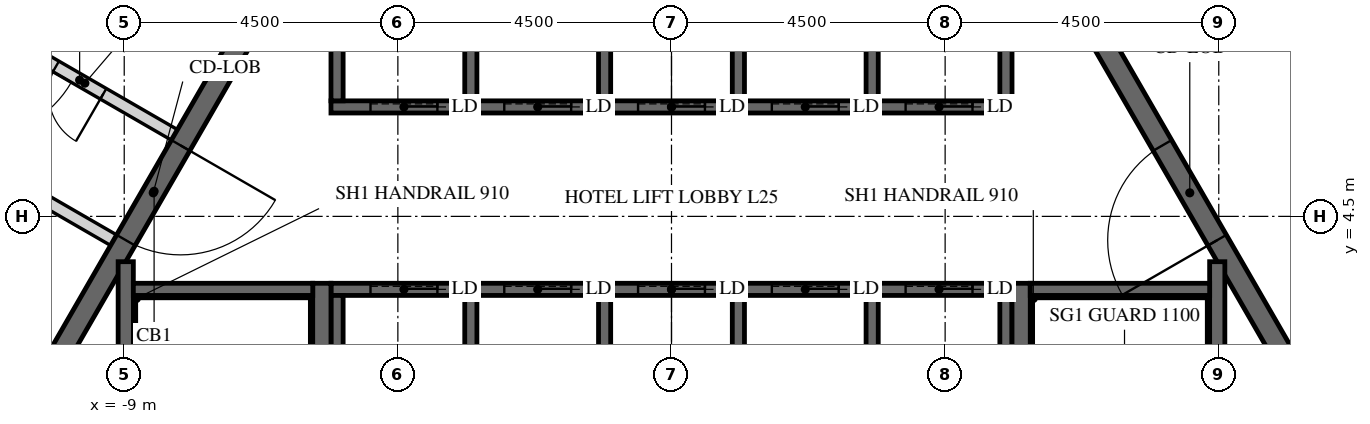
"""IFC4 building model, lengths in metres.
Left out: names, types, materials, properties, quantities, classifications, styles, units other than length and angle.
Written with IfcOpenShell. Run it as: python <this file> out.ifc"""

import sys

from ifc_helpers import new_model, si_unit, direction, frame, frame_2d, origin, place, context, subcontext, project, spatial, polyline, rectangle, outline, extrude, element, fill, save


model = new_model("IFC4")
c1 = context("Model", 3, precision=1e-05, world=origin(), true_north=direction((0.0, 1.0)))
c2 = subcontext(c1, "Body", "Model", "MODEL_VIEW")
j1 = project(units=[si_unit("LENGTHUNIT", "METRE"), si_unit("PLANEANGLEUNIT", "RADIAN")], contexts=[c1])
p1 = place(None, origin())
s1 = spatial("IfcSite", under=j1, at=p1, CompositionType="ELEMENT")
p2 = place(p1, origin())
s2 = spatial("IfcBuilding", under=s1, at=p2, CompositionType="ELEMENT")
p3 = place(p2, frame((0.0, 0.0, 111.6)))
s3 = spatial("IfcBuildingStorey", under=s2, at=p3, CompositionType="ELEMENT", Elevation=111.6)
p4 = place(p3, frame((-7.91, 13.7, -0.15), z_axis=(0.0, 0.0, 1.0), x_axis=(-0.499999880136, -0.866025472988, 0.0)))
e1 = element("IfcWall", 1, at=p4, inside=s3, PredefinedType="SHEAR", context=c2, shape_type="SweptSolid", body=[
    extrude(outline(polyline([(-0.173, -0.3), (15.993, -0.3), (15.646, 0.3), (0.173, 0.3), (-0.173, -0.3)])), origin(), (0.0, 0.0, 1.0), 3.9),
])
p5 = place(p4, frame((7.039, 0.0, 0.15)))
e2 = element("IfcOpeningElement", 2, at=p5, cuts=e1, PredefinedType="OPENING", context=c2, shape_type="SweptSolid", body=[
    extrude(rectangle(XDim=1.8, YDim=2.4, at=frame_2d((0.9, 1.2))), frame((0.0, 0.31, 0.0), z_axis=(0.0, -1.0, 0.0), x_axis=(1.0, 0.0, 0.0)), (0.0, 0.0, 1.0), 0.62),
])
p6 = place(p3, frame((15.819, 0.0, -0.15), z_axis=(0.0, 0.0, 1.0), x_axis=(-0.499999880136, 0.866025472988, 0.0)))
e3 = element("IfcWall", 3, at=p6, inside=s3, PredefinedType="SHEAR", context=c2, shape_type="SweptSolid", body=[
    extrude(outline(polyline([(-0.173, -0.3), (15.993, -0.3), (15.646, 0.3), (0.173, 0.3), (-0.173, -0.3)])), origin(), (0.0, 0.0, 1.0), 3.9),
])
p7 = place(p6, frame((6.981, 0.0, 0.15)))
e4 = element("IfcOpeningElement", 4, at=p7, cuts=e3, PredefinedType="OPENING", context=c2, shape_type="SweptSolid", body=[
    extrude(rectangle(XDim=1.8, YDim=2.4, at=frame_2d((0.9, 1.2))), frame((0.0, 0.31, 0.0), z_axis=(0.0, -1.0, 0.0), x_axis=(1.0, 0.0, 0.0)), (0.0, 0.0, 1.0), 0.62),
])
p8 = place(p3, frame((-5.673, 9.825, -0.15), z_axis=(0.0, 0.0, 1.0), x_axis=(-0.499995046907, -0.866028263435, 0.0)))
e5 = element("IfcWall", 5, at=p8, inside=s3, PredefinedType="SHEAR", context=c2, shape_type="SweptSolid", body=[
    extrude(outline(polyline([(-0.101, -0.175), (11.446, -0.175), (11.244, 0.175), (0.101, 0.175), (-0.101, -0.175)])), origin(), (0.0, 0.0, 1.0), 3.9),
])
p9 = place(p8, frame((4.801, 0.0, 0.15)))
e6 = element("IfcOpeningElement", 6, at=p9, cuts=e5, PredefinedType="OPENING", context=c2, shape_type="SweptSolid", body=[
    extrude(rectangle(XDim=1.8, YDim=2.4, at=frame_2d((0.9, 1.2))), frame((0.0, 0.185, 0.0), z_axis=(0.0, -1.0, 0.0), x_axis=(1.0, 0.0, 0.0)), (0.0, 0.0, 1.0), 0.37),
])
p10 = place(p3, frame((11.345, 0.0, -0.15), z_axis=(0.0, 0.0, 1.0), x_axis=(-0.499995046907, 0.866028263435, 0.0)))
e7 = element("IfcWall", 7, at=p10, inside=s3, PredefinedType="SHEAR", context=c2, shape_type="SweptSolid", body=[
    extrude(outline(polyline([(-0.101, -0.175), (11.446, -0.175), (11.244, 0.175), (0.101, 0.175), (-0.101, -0.175)])), origin(), (0.0, 0.0, 1.0), 3.9),
])
p11 = place(p10, frame((4.744, 0.0, 0.15)))
e8 = element("IfcOpeningElement", 8, at=p11, cuts=e7, PredefinedType="OPENING", context=c2, shape_type="SweptSolid", body=[
    extrude(rectangle(XDim=1.8, YDim=2.4, at=frame_2d((0.9, 1.2))), frame((0.0, 0.185, 0.0), z_axis=(0.0, -1.0, 0.0), x_axis=(1.0, 0.0, 0.0)), (0.0, 0.0, 1.0), 0.37),
])
p12 = place(p3, frame((-5.6, 6.3, -0.25), z_axis=(0.0, 0.0, 1.0), x_axis=(1.0, 0.0, 0.0)))
e9 = element("IfcWall", 9, at=p12, inside=s3, PredefinedType="SHEAR", context=c2, shape_type="SweptSolid", body=[
    extrude(rectangle(XDim=11.2, YDim=0.2, at=frame_2d((5.6, 0.0))), origin(), (0.0, 0.0, 1.0), 3.9),
])
p13 = place(p12, frame((0.65, 0.0, 0.25)))
e10 = element("IfcOpeningElement", 10, at=p13, cuts=e9, PredefinedType="OPENING", context=c2, shape_type="SweptSolid", body=[
    extrude(rectangle(XDim=1.1, YDim=2.1, at=frame_2d((0.55, 1.05))), frame((0.0, 0.11, 0.0), z_axis=(0.0, -1.0, 0.0), x_axis=(1.0, 0.0, 0.0)), (0.0, 0.0, 1.0), 0.22),
])
p14 = place(p12, frame((2.85, 0.0, 0.25)))
e11 = element("IfcOpeningElement", 11, at=p14, cuts=e9, PredefinedType="OPENING", context=c2, shape_type="SweptSolid", body=[
    extrude(rectangle(XDim=1.1, YDim=2.1, at=frame_2d((0.55, 1.05))), frame((0.0, 0.11, 0.0), z_axis=(0.0, -1.0, 0.0), x_axis=(1.0, 0.0, 0.0)), (0.0, 0.0, 1.0), 0.22),
])
p15 = place(p12, frame((5.05, 0.0, 0.25)))
e12 = element("IfcOpeningElement", 12, at=p15, cuts=e9, PredefinedType="OPENING", context=c2, shape_type="SweptSolid", body=[
    extrude(rectangle(XDim=1.1, YDim=2.1, at=frame_2d((0.55, 1.05))), frame((0.0, 0.11, 0.0), z_axis=(0.0, -1.0, 0.0), x_axis=(1.0, 0.0, 0.0)), (0.0, 0.0, 1.0), 0.22),
])
p16 = place(p12, frame((7.25, 0.0, 0.25)))
e13 = element("IfcOpeningElement", 13, at=p16, cuts=e9, PredefinedType="OPENING", context=c2, shape_type="SweptSolid", body=[
    extrude(rectangle(XDim=1.1, YDim=2.1, at=frame_2d((0.55, 1.05))), frame((0.0, 0.11, 0.0), z_axis=(0.0, -1.0, 0.0), x_axis=(1.0, 0.0, 0.0)), (0.0, 0.0, 1.0), 0.22),
])
p17 = place(p12, frame((9.45, 0.0, 0.25)))
e14 = element("IfcOpeningElement", 14, at=p17, cuts=e9, PredefinedType="OPENING", context=c2, shape_type="SweptSolid", body=[
    extrude(rectangle(XDim=1.1, YDim=2.1, at=frame_2d((0.55, 1.05))), frame((0.0, 0.11, 0.0), z_axis=(0.0, -1.0, 0.0), x_axis=(1.0, 0.0, 0.0)), (0.0, 0.0, 1.0), 0.22),
])
for number, where, z_axis, x_axis in (
    (15, (-5.5, 6.4, -0.25), (0.0, 0.0, 1.0), (0.0, 1.0, 0.0)),
    (16, (-3.3, 6.4, -0.25), (0.0, 0.0, 1.0), (0.0, 1.0, 0.0)),
    (17, (-1.1, 6.4, -0.25), (0.0, 0.0, 1.0), (0.0, 1.0, 0.0)),
    (18, (1.1, 6.4, -0.25), (0.0, 0.0, 1.0), (0.0, 1.0, 0.0)),
    (19, (3.3, 6.4, -0.25), (0.0, 0.0, 1.0), (0.0, 1.0, 0.0)),
    (20, (5.5, 6.4, -0.25), (0.0, 0.0, 1.0), (0.0, 1.0, 0.0)),
):
    element("IfcWall", number, at=place(p3, frame(where, z_axis=z_axis, x_axis=x_axis)), inside=s3, PredefinedType="SHEAR", context=c2, shape_type="SweptSolid", body=[
        extrude(rectangle(XDim=2.9, YDim=0.2, at=frame_2d((1.45, 0.0))), origin(), (0.0, 0.0, 1.0), 3.9),
    ])
p18 = place(p3, frame((-5.6, 3.3, -0.25), z_axis=(0.0, 0.0, 1.0), x_axis=(1.0, 0.0, 0.0)))
e21 = element("IfcWall", 21, at=p18, inside=s3, PredefinedType="SHEAR", context=c2, shape_type="SweptSolid", body=[
    extrude(rectangle(XDim=11.2, YDim=0.2, at=frame_2d((5.6, 0.0))), origin(), (0.0, 0.0, 1.0), 3.9),
])
p19 = place(p18, frame((0.65, 0.0, 0.25)))
e22 = element("IfcOpeningElement", 22, at=p19, cuts=e21, PredefinedType="OPENING", context=c2, shape_type="SweptSolid", body=[
    extrude(rectangle(XDim=1.1, YDim=2.1, at=frame_2d((0.55, 1.05))), frame((0.0, 0.11, 0.0), z_axis=(0.0, -1.0, 0.0), x_axis=(1.0, 0.0, 0.0)), (0.0, 0.0, 1.0), 0.22),
])
p20 = place(p18, frame((2.85, 0.0, 0.25)))
e23 = element("IfcOpeningElement", 23, at=p20, cuts=e21, PredefinedType="OPENING", context=c2, shape_type="SweptSolid", body=[
    extrude(rectangle(XDim=1.1, YDim=2.1, at=frame_2d((0.55, 1.05))), frame((0.0, 0.11, 0.0), z_axis=(0.0, -1.0, 0.0), x_axis=(1.0, 0.0, 0.0)), (0.0, 0.0, 1.0), 0.22),
])
p21 = place(p18, frame((5.05, 0.0, 0.25)))
e24 = element("IfcOpeningElement", 24, at=p21, cuts=e21, PredefinedType="OPENING", context=c2, shape_type="SweptSolid", body=[
    extrude(rectangle(XDim=1.1, YDim=2.1, at=frame_2d((0.55, 1.05))), frame((0.0, 0.11, 0.0), z_axis=(0.0, -1.0, 0.0), x_axis=(1.0, 0.0, 0.0)), (0.0, 0.0, 1.0), 0.22),
])
p22 = place(p18, frame((7.25, 0.0, 0.25)))
e25 = element("IfcOpeningElement", 25, at=p22, cuts=e21, PredefinedType="OPENING", context=c2, shape_type="SweptSolid", body=[
    extrude(rectangle(XDim=1.1, YDim=2.1, at=frame_2d((0.55, 1.05))), frame((0.0, 0.11, 0.0), z_axis=(0.0, -1.0, 0.0), x_axis=(1.0, 0.0, 0.0)), (0.0, 0.0, 1.0), 0.22),
])
p23 = place(p18, frame((9.45, 0.0, 0.25)))
e26 = element("IfcOpeningElement", 26, at=p23, cuts=e21, PredefinedType="OPENING", context=c2, shape_type="SweptSolid", body=[
    extrude(rectangle(XDim=1.1, YDim=2.1, at=frame_2d((0.55, 1.05))), frame((0.0, 0.11, 0.0), z_axis=(0.0, -1.0, 0.0), x_axis=(1.0, 0.0, 0.0)), (0.0, 0.0, 1.0), 0.22),
])
for number, where, z_axis, x_axis in (
    (27, (-5.5, 0.1, -0.25), (0.0, 0.0, 1.0), (0.0, 1.0, 0.0)),
    (28, (-3.3, 0.1, -0.25), (0.0, 0.0, 1.0), (0.0, 1.0, 0.0)),
    (29, (-1.1, 0.1, -0.25), (0.0, 0.0, 1.0), (0.0, 1.0, 0.0)),
    (30, (1.1, 0.1, -0.25), (0.0, 0.0, 1.0), (0.0, 1.0, 0.0)),
    (31, (3.3, 0.1, -0.25), (0.0, 0.0, 1.0), (0.0, 1.0, 0.0)),
    (32, (5.5, 0.1, -0.25), (0.0, 0.0, 1.0), (0.0, 1.0, 0.0)),
):
    element("IfcWall", number, at=place(p3, frame(where, z_axis=z_axis, x_axis=x_axis)), inside=s3, PredefinedType="SHEAR", context=c2, shape_type="SweptSolid", body=[
        extrude(rectangle(XDim=3.1, YDim=0.2, at=frame_2d((1.55, 0.0))), origin(), (0.0, 0.0, 1.0), 3.9),
    ])
p24 = place(p3, frame((-9.175, 4.109, 0.0), z_axis=(0.0, 0.0, 1.0), x_axis=(-0.865989465428, 0.500062241894, 0.0)))
e33 = element("IfcWall", 33, at=p24, inside=s3, PredefinedType="PARTITIONING", context=c2, shape_type="SweptSolid", body=[
    extrude(rectangle(XDim=3.4, YDim=0.2, at=frame_2d((1.7, 0.0))), origin(), (0.0, 0.0, 1.0), 3.65),
])
p25 = place(p24, frame((1.351, 0.0, 0.0)))
e34 = element("IfcOpeningElement", 34, at=p25, cuts=e33, PredefinedType="OPENING", context=c2, shape_type="SweptSolid", body=[
    extrude(rectangle(XDim=0.9, YDim=2.1, at=frame_2d((0.45, 1.05))), frame((0.0, 0.11, 0.0), z_axis=(0.0, -1.0, 0.0), x_axis=(1.0, 0.0, 0.0)), (0.0, 0.0, 1.0), 0.22),
])
p26 = place(p3, frame((-8.175, 5.841, 0.0), z_axis=(0.0, 0.0, 1.0), x_axis=(-0.866020560687, 0.500008388397, 0.0)))
e35 = element("IfcWall", 35, at=p26, inside=s3, PredefinedType="PARTITIONING", context=c2, shape_type="SweptSolid", body=[
    extrude(rectangle(XDim=3.4, YDim=0.2, at=frame_2d((1.7, 0.0))), origin(), (0.0, 0.0, 1.0), 3.65),
])
p27 = place(p26, frame((1.35, 0.0, 0.0)))
e36 = element("IfcOpeningElement", 36, at=p27, cuts=e35, PredefinedType="OPENING", context=c2, shape_type="SweptSolid", body=[
    extrude(rectangle(XDim=0.9, YDim=2.1, at=frame_2d((0.45, 1.05))), frame((0.0, 0.11, 0.0), z_axis=(0.0, -1.0, 0.0), x_axis=(1.0, 0.0, 0.0)), (0.0, 0.0, 1.0), 0.22),
])
p28 = place(p3, frame((5.75, -3.4, -0.25), z_axis=(0.0, 0.0, 1.0), x_axis=(0.0, 1.0, 0.0)))
e37 = element("IfcWall", 37, at=p28, inside=s3, PredefinedType="SHEAR", context=c2, shape_type="SweptSolid", body=[
    extrude(rectangle(XDim=6.8, YDim=0.3, at=frame_2d((3.4, 0.0))), origin(), (0.0, 0.0, 1.0), 3.9),
])
p29 = place(p3, frame((8.975, -3.755, -0.25), z_axis=(0.0, 0.0, 1.0), x_axis=(0.0, 1.0, 0.0)))
e38 = element("IfcWall", 38, at=p29, inside=s3, PredefinedType="SHEAR", context=c2, shape_type="SweptSolid", body=[
    extrude(rectangle(XDim=7.51, YDim=0.25, at=frame_2d((3.755, 0.0))), origin(), (0.0, 0.0, 1.0), 3.9),
])
p30 = place(p3, frame((5.9, 3.3, -0.25), z_axis=(0.0, 0.0, 1.0), x_axis=(1.0, 0.0, 0.0)))
e39 = element("IfcWall", 39, at=p30, inside=s3, PredefinedType="SHEAR", context=c2, shape_type="SweptSolid", body=[
    extrude(rectangle(XDim=2.95, YDim=0.2, at=frame_2d((1.475, 0.0))), origin(), (0.0, 0.0, 1.0), 3.9),
])
p31 = place(p3, frame((-5.75, -3.4, -0.25), z_axis=(0.0, 0.0, 1.0), x_axis=(0.0, 1.0, 0.0)))
e40 = element("IfcWall", 40, at=p31, inside=s3, PredefinedType="SHEAR", context=c2, shape_type="SweptSolid", body=[
    extrude(rectangle(XDim=6.8, YDim=0.3, at=frame_2d((3.4, 0.0))), origin(), (0.0, 0.0, 1.0), 3.9),
])
p32 = place(p3, frame((-8.975, -3.755, -0.25), z_axis=(0.0, 0.0, 1.0), x_axis=(0.0, 1.0, 0.0)))
e41 = element("IfcWall", 41, at=p32, inside=s3, PredefinedType="SHEAR", context=c2, shape_type="SweptSolid", body=[
    extrude(rectangle(XDim=7.51, YDim=0.25, at=frame_2d((3.755, 0.0))), origin(), (0.0, 0.0, 1.0), 3.9),
])
p33 = place(p3, frame((-8.85, 3.3, -0.25), z_axis=(0.0, 0.0, 1.0), x_axis=(1.0, 0.0, 0.0)))
e42 = element("IfcWall", 42, at=p33, inside=s3, PredefinedType="SHEAR", context=c2, shape_type="SweptSolid", body=[
    extrude(rectangle(XDim=2.95, YDim=0.2, at=frame_2d((1.475, 0.0))), origin(), (0.0, 0.0, 1.0), 3.9),
])
p34 = place(p9, origin())
e43 = element("IfcDoor", 43, at=p34, inside=s3, OperationType="DOUBLE_DOOR_SINGLE_SWING", PredefinedType="DOOR", context=c2, shape_type="SweptSolid", body=[
    extrude(rectangle(XDim=1.8, YDim=2.4, at=frame_2d((0.9, 1.2))), frame((0.0, 0.025, 0.0), z_axis=(0.0, -1.0, 0.0), x_axis=(1.0, 0.0, 0.0)), (0.0, 0.0, 1.0), 0.05),
])
fill(e6, e43)
p35 = place(p11, origin())
e44 = element("IfcDoor", 44, at=p35, inside=s3, OperationType="DOUBLE_DOOR_SINGLE_SWING", PredefinedType="DOOR", context=c2, shape_type="SweptSolid", body=[
    extrude(rectangle(XDim=1.8, YDim=2.4, at=frame_2d((0.9, 1.2))), frame((0.0, 0.025, 0.0), z_axis=(0.0, -1.0, 0.0), x_axis=(1.0, 0.0, 0.0)), (0.0, 0.0, 1.0), 0.05),
])
fill(e8, e44)
p36 = place(p27, origin())
e45 = element("IfcDoor", 45, at=p36, inside=s3, OperationType="SINGLE_SWING_LEFT", PredefinedType="DOOR", context=c2, shape_type="SweptSolid", body=[
    extrude(rectangle(XDim=0.9, YDim=2.1, at=frame_2d((0.45, 1.05))), frame((0.0, 0.025, 0.0), z_axis=(0.0, -1.0, 0.0), x_axis=(1.0, 0.0, 0.0)), (0.0, 0.0, 1.0), 0.05),
])
fill(e36, e45)
p37 = place(p13, origin())
e46 = element("IfcDoor", 46, at=p37, inside=s3, OperationType="SLIDING_TO_LEFT", PredefinedType="DOOR", context=c2, shape_type="SweptSolid", body=[
    extrude(rectangle(XDim=1.1, YDim=2.1, at=frame_2d((0.55, 1.05))), frame((0.0, 0.025, 0.0), z_axis=(0.0, -1.0, 0.0), x_axis=(1.0, 0.0, 0.0)), (0.0, 0.0, 1.0), 0.05),
])
fill(e10, e46)
p38 = place(p14, origin())
e47 = element("IfcDoor", 47, at=p38, inside=s3, OperationType="SLIDING_TO_LEFT", PredefinedType="DOOR", context=c2, shape_type="SweptSolid", body=[
    extrude(rectangle(XDim=1.1, YDim=2.1, at=frame_2d((0.55, 1.05))), frame((0.0, 0.025, 0.0), z_axis=(0.0, -1.0, 0.0), x_axis=(1.0, 0.0, 0.0)), (0.0, 0.0, 1.0), 0.05),
])
fill(e11, e47)
p39 = place(p15, origin())
e48 = element("IfcDoor", 48, at=p39, inside=s3, OperationType="SLIDING_TO_LEFT", PredefinedType="DOOR", context=c2, shape_type="SweptSolid", body=[
    extrude(rectangle(XDim=1.1, YDim=2.1, at=frame_2d((0.55, 1.05))), frame((0.0, 0.025, 0.0), z_axis=(0.0, -1.0, 0.0), x_axis=(1.0, 0.0, 0.0)), (0.0, 0.0, 1.0), 0.05),
])
fill(e12, e48)
p40 = place(p16, origin())
e49 = element("IfcDoor", 49, at=p40, inside=s3, OperationType="SLIDING_TO_LEFT", PredefinedType="DOOR", context=c2, shape_type="SweptSolid", body=[
    extrude(rectangle(XDim=1.1, YDim=2.1, at=frame_2d((0.55, 1.05))), frame((0.0, 0.025, 0.0), z_axis=(0.0, -1.0, 0.0), x_axis=(1.0, 0.0, 0.0)), (0.0, 0.0, 1.0), 0.05),
])
fill(e13, e49)
p41 = place(p17, origin())
e50 = element("IfcDoor", 50, at=p41, inside=s3, OperationType="SLIDING_TO_LEFT", PredefinedType="DOOR", context=c2, shape_type="SweptSolid", body=[
    extrude(rectangle(XDim=1.1, YDim=2.1, at=frame_2d((0.55, 1.05))), frame((0.0, 0.025, 0.0), z_axis=(0.0, -1.0, 0.0), x_axis=(1.0, 0.0, 0.0)), (0.0, 0.0, 1.0), 0.05),
])
fill(e14, e50)
p42 = place(p19, origin())
e51 = element("IfcDoor", 51, at=p42, inside=s3, OperationType="SLIDING_TO_LEFT", PredefinedType="DOOR", context=c2, shape_type="SweptSolid", body=[
    extrude(rectangle(XDim=1.1, YDim=2.1, at=frame_2d((0.55, 1.05))), frame((0.0, 0.025, 0.0), z_axis=(0.0, -1.0, 0.0), x_axis=(1.0, 0.0, 0.0)), (0.0, 0.0, 1.0), 0.05),
])
fill(e22, e51)
p43 = place(p20, origin())
e52 = element("IfcDoor", 52, at=p43, inside=s3, OperationType="SLIDING_TO_LEFT", PredefinedType="DOOR", context=c2, shape_type="SweptSolid", body=[
    extrude(rectangle(XDim=1.1, YDim=2.1, at=frame_2d((0.55, 1.05))), frame((0.0, 0.025, 0.0), z_axis=(0.0, -1.0, 0.0), x_axis=(1.0, 0.0, 0.0)), (0.0, 0.0, 1.0), 0.05),
])
fill(e23, e52)
p44 = place(p21, origin())
e53 = element("IfcDoor", 53, at=p44, inside=s3, OperationType="SLIDING_TO_LEFT", PredefinedType="DOOR", context=c2, shape_type="SweptSolid", body=[
    extrude(rectangle(XDim=1.1, YDim=2.1, at=frame_2d((0.55, 1.05))), frame((0.0, 0.025, 0.0), z_axis=(0.0, -1.0, 0.0), x_axis=(1.0, 0.0, 0.0)), (0.0, 0.0, 1.0), 0.05),
])
fill(e24, e53)
p45 = place(p22, origin())
e54 = element("IfcDoor", 54, at=p45, inside=s3, OperationType="SLIDING_TO_LEFT", PredefinedType="DOOR", context=c2, shape_type="SweptSolid", body=[
    extrude(rectangle(XDim=1.1, YDim=2.1, at=frame_2d((0.55, 1.05))), frame((0.0, 0.025, 0.0), z_axis=(0.0, -1.0, 0.0), x_axis=(1.0, 0.0, 0.0)), (0.0, 0.0, 1.0), 0.05),
])
fill(e25, e54)
p46 = place(p23, origin())
e55 = element("IfcDoor", 55, at=p46, inside=s3, OperationType="SLIDING_TO_LEFT", PredefinedType="DOOR", context=c2, shape_type="SweptSolid", body=[
    extrude(rectangle(XDim=1.1, YDim=2.1, at=frame_2d((0.55, 1.05))), frame((0.0, 0.025, 0.0), z_axis=(0.0, -1.0, 0.0), x_axis=(1.0, 0.0, 0.0)), (0.0, 0.0, 1.0), 0.05),
])
fill(e26, e55)
save(model, sys.argv[1])
